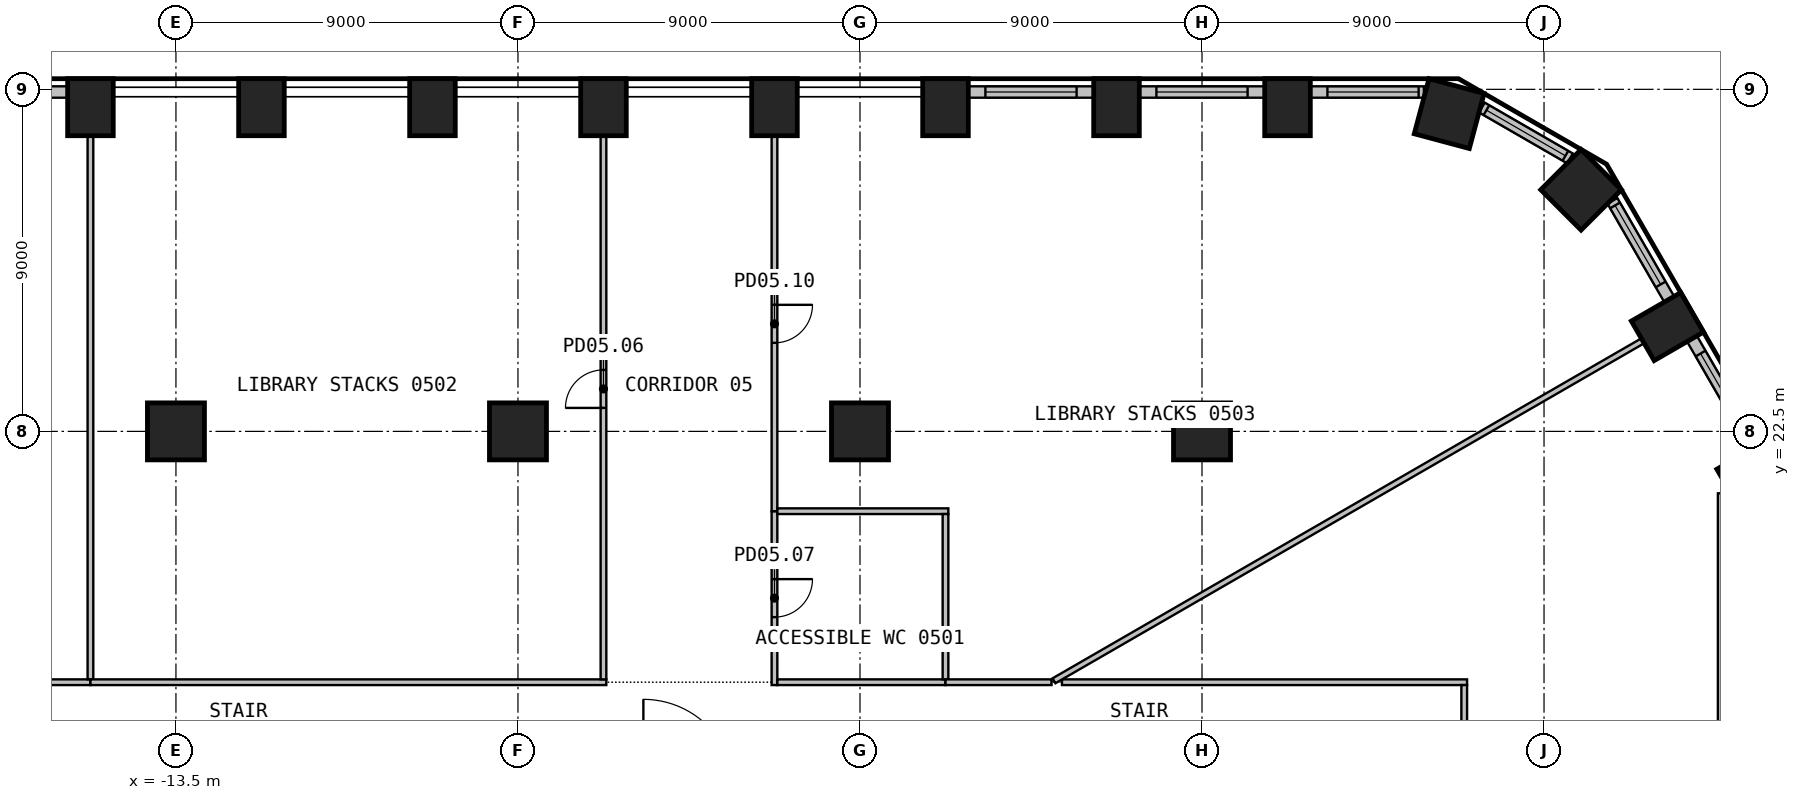
"""IFC4 building model, lengths in metres.
Left out: names, types, materials, properties, quantities, classifications, styles, units other than length and angle.
Written with IfcOpenShell. Run it as: python <this file> out.ifc"""

import sys

from ifc_helpers import new_model, si_unit, direction, frame, frame_2d, origin, origin_2d, place, context, subcontext, project, spatial, rectangle, circle, extrude, element, fill, save


model = new_model("IFC4")
c1 = context("Model", 3, precision=1e-05, world=origin(), true_north=direction((0.0, 1.0)))
c2 = subcontext(c1, "Body", "Model", "MODEL_VIEW")
j1 = project(units=[si_unit("LENGTHUNIT", "METRE"), si_unit("PLANEANGLEUNIT", "RADIAN")], contexts=[c1])
p1 = place(None, origin())
s1 = spatial("IfcSite", under=j1, at=p1, CompositionType="ELEMENT")
p2 = place(p1, origin())
s2 = spatial("IfcBuilding", under=s1, at=p2, CompositionType="ELEMENT")
p3 = place(p2, frame((0.0, 0.0, 25.2)))
s3 = spatial("IfcBuildingStorey", under=s2, at=p3, CompositionType="ELEMENT", Elevation=25.2)
for number, where, z_axis, x_axis in (
    (1, (27.998, 21.361, 0.0), (0.0, 0.0, 1.0), (-0.5, 0.866, 0.0)),
    (2, (25.748, 25.258, 0.0), (0.0, 0.0, 1.0), (-0.5, 0.866, 0.0)),
):
    element("IfcColumn", number, at=place(p3, frame(where, z_axis=z_axis, x_axis=x_axis)), inside=s3, PredefinedType="COLUMN", context=c2, shape_type="SweptSolid", body=[
        extrude(rectangle(XDim=1.2, YDim=1.5, at=origin_2d()), origin(), (0.0, 0.0, 1.0), 4.425),
    ])
for number, where, z_axis, x_axis in (
    (3, (23.475, 28.857, 0.0), (0.0, 0.0, 1.0), (-0.707, 0.707, 0.0)),
    (4, (20.004, 30.861, 0.0), (0.0, 0.0, 1.0), (-0.966, 0.259, 0.0)),
):
    element("IfcColumn", number, at=place(p3, frame(where, z_axis=z_axis, x_axis=x_axis)), inside=s3, PredefinedType="COLUMN", context=c2, shape_type="SweptSolid", body=[
        extrude(rectangle(XDim=1.5, YDim=1.5, at=origin_2d()), origin(), (0.0, 0.0, 1.0), 4.425),
    ])
for number, where, z_axis, x_axis in (
    (5, (15.75, 31.03, 0.0), (0.0, 0.0, 1.0), (-1.0, 0.0, 0.0)),
    (6, (11.25, 31.03, 0.0), (0.0, 0.0, 1.0), (-1.0, 0.0, 0.0)),
    (7, (6.75, 31.03, 0.0), (0.0, 0.0, 1.0), (-1.0, 0.0, 0.0)),
    (8, (2.25, 31.03, 0.0), (0.0, 0.0, 1.0), (-1.0, 0.0, 0.0)),
    (9, (-2.25, 31.03, 0.0), (0.0, 0.0, 1.0), (-1.0, 0.0, 0.0)),
    (10, (-6.75, 31.03, 0.0), (0.0, 0.0, 1.0), (-1.0, 0.0, 0.0)),
    (11, (-11.25, 31.03, 0.0), (0.0, 0.0, 1.0), (-1.0, 0.0, 0.0)),
    (12, (-15.75, 31.03, 0.0), (0.0, 0.0, 1.0), (-1.0, 0.0, 0.0)),
):
    element("IfcColumn", number, at=place(p3, frame(where, z_axis=z_axis, x_axis=x_axis)), inside=s3, PredefinedType="COLUMN", context=c2, shape_type="SweptSolid", body=[
        extrude(rectangle(XDim=1.2, YDim=1.5, at=origin_2d()), origin(), (0.0, 0.0, 1.0), 4.425),
    ])
for number, where, z_axis, x_axis in (
    (13, (-13.5, 22.5, 0.0), (0.0, 0.0, 1.0), (1.0, 0.0, 0.0)),
    (14, (-4.5, 22.5, 0.0), (0.0, 0.0, 1.0), (1.0, 0.0, 0.0)),
    (15, (4.5, 22.5, 0.0), (0.0, 0.0, 1.0), (1.0, 0.0, 0.0)),
    (16, (13.5, 22.5, 0.0), (0.0, 0.0, 1.0), (1.0, 0.0, 0.0)),
):
    element("IfcColumn", number, at=place(p3, frame(where, z_axis=z_axis, x_axis=x_axis)), inside=s3, PredefinedType="COLUMN", context=c2, shape_type="SweptSolid", body=[
        extrude(circle(Radius=0.75, at=origin_2d()), origin(), (0.0, 0.0, 1.0), 4.425),
    ])
p4 = place(p3, frame((28.044, 22.081, 0.0), z_axis=(0.0, 0.0, 1.0), x_axis=(-0.499991515992, 0.866030301974, 0.0)))
e17 = element("IfcWall", 17, at=p4, inside=s3, PredefinedType="SOLIDWALL", context=c2, shape_type="SweptSolid", body=[
    extrude(rectangle(XDim=3.299, YDim=0.3, at=frame_2d((1.649, 0.0))), origin(), (0.0, 0.0, 1.0), 4.425),
])
p5 = place(p4, frame((0.449, 0.0, 0.9)))
e18 = element("IfcOpeningElement", 18, at=p5, cuts=e17, PredefinedType="OPENING", context=c2, shape_type="SweptSolid", body=[
    extrude(rectangle(XDim=2.4, YDim=3.0, at=frame_2d((1.2, 1.5))), frame((0.0, 0.16, 0.0), z_axis=(0.0, -1.0, 0.0), x_axis=(1.0, 0.0, 0.0)), (0.0, 0.0, 1.0), 0.32),
])
p6 = place(p3, frame((25.794, 25.978, 0.0), z_axis=(0.0, 0.0, 1.0), x_axis=(-0.49999586137, 0.866027793211, 0.0)))
e19 = element("IfcWall", 19, at=p6, inside=s3, PredefinedType="SOLIDWALL", context=c2, shape_type="SweptSolid", body=[
    extrude(rectangle(XDim=2.989, YDim=0.3, at=frame_2d((1.494, 0.0))), origin(), (0.0, 0.0, 1.0), 4.425),
])
p7 = place(p6, frame((0.449, 0.0, 0.9)))
e20 = element("IfcOpeningElement", 20, at=p7, cuts=e19, PredefinedType="OPENING", context=c2, shape_type="SweptSolid", body=[
    extrude(rectangle(XDim=2.4, YDim=3.0, at=frame_2d((1.2, 1.5))), frame((0.0, 0.16, 0.0), z_axis=(0.0, -1.0, 0.0), x_axis=(1.0, 0.0, 0.0)), (0.0, 0.0, 1.0), 0.32),
])
p8 = place(p3, frame((23.183, 29.682, 0.0), z_axis=(0.0, 0.0, 1.0), x_axis=(-0.866001915448, 0.500040680786, 0.0)))
e21 = element("IfcWall", 21, at=p8, inside=s3, PredefinedType="SOLIDWALL", context=c2, shape_type="SweptSolid", body=[
    extrude(rectangle(XDim=2.678, YDim=0.3, at=frame_2d((1.339, 0.0))), origin(), (0.0, 0.0, 1.0), 4.425),
])
p9 = place(p8, frame((0.139, 0.0, 0.9)))
e22 = element("IfcOpeningElement", 22, at=p9, cuts=e21, PredefinedType="OPENING", context=c2, shape_type="SweptSolid", body=[
    extrude(rectangle(XDim=2.4, YDim=3.0, at=frame_2d((1.2, 1.5))), frame((0.0, 0.16, 0.0), z_axis=(0.0, -1.0, 0.0), x_axis=(1.0, 0.0, 0.0)), (0.0, 0.0, 1.0), 0.32),
])
p10 = place(p3, frame((19.339, 31.43, 0.0), z_axis=(0.0, 0.0, 1.0), x_axis=(-1.0, 0.0, 0.0)))
e23 = element("IfcWall", 23, at=p10, inside=s3, PredefinedType="SOLIDWALL", context=c2, shape_type="SweptSolid", body=[
    extrude(rectangle(XDim=2.989, YDim=0.3, at=frame_2d((1.494, 0.0))), origin(), (0.0, 0.0, 1.0), 4.425),
])
p11 = place(p10, frame((0.139, 0.0, 0.9)))
e24 = element("IfcOpeningElement", 24, at=p11, cuts=e23, PredefinedType="OPENING", context=c2, shape_type="SweptSolid", body=[
    extrude(rectangle(XDim=2.4, YDim=3.0, at=frame_2d((1.2, 1.5))), frame((0.0, 0.16, 0.0), z_axis=(0.0, -1.0, 0.0), x_axis=(1.0, 0.0, 0.0)), (0.0, 0.0, 1.0), 0.32),
])
p12 = place(p3, frame((15.149, 31.43, 0.0), z_axis=(0.0, 0.0, 1.0), x_axis=(-1.0, 0.0, 0.0)))
e25 = element("IfcWall", 25, at=p12, inside=s3, PredefinedType="SOLIDWALL", context=c2, shape_type="SweptSolid", body=[
    extrude(rectangle(XDim=3.299, YDim=0.3, at=frame_2d((1.649, 0.0))), origin(), (0.0, 0.0, 1.0), 4.425),
])
p13 = place(p12, frame((0.449, 0.0, 0.9)))
e26 = element("IfcOpeningElement", 26, at=p13, cuts=e25, PredefinedType="OPENING", context=c2, shape_type="SweptSolid", body=[
    extrude(rectangle(XDim=2.4, YDim=3.0, at=frame_2d((1.2, 1.5))), frame((0.0, 0.16, 0.0), z_axis=(0.0, -1.0, 0.0), x_axis=(1.0, 0.0, 0.0)), (0.0, 0.0, 1.0), 0.32),
])
p14 = place(p3, frame((10.649, 31.43, 0.0), z_axis=(0.0, 0.0, 1.0), x_axis=(-1.0, 0.0, 0.0)))
e27 = element("IfcWall", 27, at=p14, inside=s3, PredefinedType="SOLIDWALL", context=c2, shape_type="SweptSolid", body=[
    extrude(rectangle(XDim=3.299, YDim=0.3, at=frame_2d((1.649, 0.0))), origin(), (0.0, 0.0, 1.0), 4.425),
])
p15 = place(p14, frame((0.449, 0.0, 0.9)))
e28 = element("IfcOpeningElement", 28, at=p15, cuts=e27, PredefinedType="OPENING", context=c2, shape_type="SweptSolid", body=[
    extrude(rectangle(XDim=2.4, YDim=3.0, at=frame_2d((1.2, 1.5))), frame((0.0, 0.16, 0.0), z_axis=(0.0, -1.0, 0.0), x_axis=(1.0, 0.0, 0.0)), (0.0, 0.0, 1.0), 0.32),
])
p16 = place(p3, frame((-16.351, 31.43, 0.0), z_axis=(0.0, 0.0, 1.0), x_axis=(-1.0, 0.0, 0.0)))
e29 = element("IfcWall", 29, at=p16, inside=s3, PredefinedType="SOLIDWALL", context=c2, shape_type="SweptSolid", body=[
    extrude(rectangle(XDim=2.989, YDim=0.3, at=frame_2d((1.494, 0.0))), origin(), (0.0, 0.0, 1.0), 4.425),
])
p17 = place(p16, frame((0.449, 0.0, 0.9)))
e30 = element("IfcOpeningElement", 30, at=p17, cuts=e29, PredefinedType="OPENING", context=c2, shape_type="SweptSolid", body=[
    extrude(rectangle(XDim=2.4, YDim=3.0, at=frame_2d((1.2, 1.5))), frame((0.0, 0.16, 0.0), z_axis=(0.0, -1.0, 0.0), x_axis=(1.0, 0.0, 0.0)), (0.0, 0.0, 1.0), 0.32),
])
p18 = place(p3, frame((-15.75, 15.9, 0.0), z_axis=(0.0, 0.0, 1.0), x_axis=(-1.0, 0.0, 0.0)))
e31 = element("IfcWall", 31, at=p18, inside=s3, PredefinedType="PARTITIONING", context=c2, shape_type="SweptSolid", body=[
    extrude(rectangle(XDim=4.575, YDim=0.15, at=frame_2d((2.288, 0.0))), origin(), (0.0, 0.0, 1.0), 4.425),
])
p19 = place(p3, frame((-15.75, 30.26, 0.0), z_axis=(0.0, 0.0, 1.0), x_axis=(0.0, -1.0, 0.0)))
e32 = element("IfcWall", 32, at=p19, inside=s3, PredefinedType="PARTITIONING", context=c2, shape_type="SweptSolid", body=[
    extrude(rectangle(XDim=14.285, YDim=0.15, at=frame_2d((7.142, 0.0))), origin(), (0.0, 0.0, 1.0), 4.425),
])
p20 = place(p3, frame((-2.175, 15.9, 0.0), z_axis=(0.0, 0.0, 1.0), x_axis=(-1.0, 0.0, 0.0)))
e33 = element("IfcWall", 33, at=p20, inside=s3, PredefinedType="PARTITIONING", context=c2, shape_type="SweptSolid", body=[
    extrude(rectangle(XDim=13.575, YDim=0.15, at=frame_2d((6.788, 0.0))), origin(), (0.0, 0.0, 1.0), 4.425),
])
p21 = place(p3, frame((-2.25, 15.975, 0.0), z_axis=(0.0, 0.0, 1.0), x_axis=(0.0, 1.0, 0.0)))
e34 = element("IfcWall", 34, at=p21, inside=s3, PredefinedType="PARTITIONING", context=c2, shape_type="SweptSolid", body=[
    extrude(rectangle(XDim=14.285, YDim=0.15, at=frame_2d((7.142, 0.0))), origin(), (0.0, 0.0, 1.0), 4.425),
])
p22 = place(p21, frame((7.142, 0.0, 0.0)))
e35 = element("IfcOpeningElement", 35, at=p22, cuts=e34, PredefinedType="OPENING", context=c2, shape_type="SweptSolid", body=[
    extrude(rectangle(XDim=1.0, YDim=2.1, at=frame_2d((0.5, 1.05))), frame((0.0, 0.085, 0.0), z_axis=(0.0, -1.0, 0.0), x_axis=(1.0, 0.0, 0.0)), (0.0, 0.0, 1.0), 0.17),
])
p23 = place(p3, frame((2.25, 20.4, 0.0), z_axis=(0.0, 0.0, 1.0), x_axis=(0.0, -1.0, 0.0)))
e36 = element("IfcWall", 36, at=p23, inside=s3, PredefinedType="PARTITIONING", context=c2, shape_type="SweptSolid", body=[
    extrude(rectangle(XDim=4.575, YDim=0.15, at=frame_2d((2.288, 0.0))), origin(), (0.0, 0.0, 1.0), 4.425),
])
p24 = place(p23, frame((1.788, 0.0, 0.0)))
e37 = element("IfcOpeningElement", 37, at=p24, cuts=e36, PredefinedType="OPENING", context=c2, shape_type="SweptSolid", body=[
    extrude(rectangle(XDim=1.0, YDim=2.1, at=frame_2d((0.5, 1.05))), frame((0.0, 0.085, 0.0), z_axis=(0.0, -1.0, 0.0), x_axis=(1.0, 0.0, 0.0)), (0.0, 0.0, 1.0), 0.17),
])
p25 = place(p3, frame((6.75, 15.9, 0.0), z_axis=(0.0, 0.0, 1.0), x_axis=(-1.0, 0.0, 0.0)))
e38 = element("IfcWall", 38, at=p25, inside=s3, PredefinedType="PARTITIONING", context=c2, shape_type="SweptSolid", body=[
    extrude(rectangle(XDim=4.425, YDim=0.15, at=frame_2d((2.212, 0.0))), origin(), (0.0, 0.0, 1.0), 4.425),
])
p26 = place(p3, frame((2.25, 30.26, 0.0), z_axis=(0.0, 0.0, 1.0), x_axis=(0.0, -1.0, 0.0)))
e39 = element("IfcWall", 39, at=p26, inside=s3, PredefinedType="PARTITIONING", context=c2, shape_type="SweptSolid", body=[
    extrude(rectangle(XDim=9.86, YDim=0.15, at=frame_2d((4.93, 0.0))), origin(), (0.0, 0.0, 1.0), 4.425),
])
p27 = place(p26, frame((4.43, 0.0, 0.0)))
e40 = element("IfcOpeningElement", 40, at=p27, cuts=e39, PredefinedType="OPENING", context=c2, shape_type="SweptSolid", body=[
    extrude(rectangle(XDim=1.0, YDim=2.1, at=frame_2d((0.5, 1.05))), frame((0.0, 0.085, 0.0), z_axis=(0.0, -1.0, 0.0), x_axis=(1.0, 0.0, 0.0)), (0.0, 0.0, 1.0), 0.17),
])
p28 = place(p3, frame((2.325, 20.4, 0.0), z_axis=(0.0, 0.0, 1.0), x_axis=(1.0, 0.0, 0.0)))
e41 = element("IfcWall", 41, at=p28, inside=s3, PredefinedType="PARTITIONING", context=c2, shape_type="SweptSolid", body=[
    extrude(rectangle(XDim=4.5, YDim=0.15, at=frame_2d((2.25, 0.0))), origin(), (0.0, 0.0, 1.0), 4.425),
])
p29 = place(p3, frame((6.75, 20.325, 0.0), z_axis=(0.0, 0.0, 1.0), x_axis=(0.0, -1.0, 0.0)))
e42 = element("IfcWall", 42, at=p29, inside=s3, PredefinedType="PARTITIONING", context=c2, shape_type="SweptSolid", body=[
    extrude(rectangle(XDim=4.35, YDim=0.15, at=frame_2d((2.175, 0.0))), origin(), (0.0, 0.0, 1.0), 4.425),
])
p30 = place(p3, frame((9.54, 15.9, 0.0), z_axis=(0.0, 0.0, 1.0), x_axis=(-1.0, 0.0, 0.0)))
e43 = element("IfcWall", 43, at=p30, inside=s3, PredefinedType="PARTITIONING", context=c2, shape_type="SweptSolid", body=[
    extrude(rectangle(XDim=2.79, YDim=0.15, at=frame_2d((1.395, 0.0))), origin(), (0.0, 0.0, 1.0), 4.425),
])
p31 = place(p3, frame((20.475, 15.9, 0.0), z_axis=(0.0, 0.0, 1.0), x_axis=(-1.0, 0.0, 0.0)))
e44 = element("IfcWall", 44, at=p31, inside=s3, PredefinedType="PARTITIONING", context=c2, shape_type="SweptSolid", body=[
    extrude(rectangle(XDim=10.66, YDim=0.15, at=frame_2d((5.33, 0.0))), origin(), (0.0, 0.0, 1.0), 4.425),
])
p32 = place(p3, frame((25.081, 24.873, 0.0), z_axis=(0.0, 0.0, 1.0), x_axis=(-0.866008122325, -0.500029931171, 0.0)))
e45 = element("IfcWall", 45, at=p32, inside=s3, PredefinedType="PARTITIONING", context=c2, shape_type="SweptSolid", body=[
    extrude(rectangle(XDim=17.87, YDim=0.15, at=frame_2d((8.935, 0.0))), origin(), (0.0, 0.0, 1.0), 4.425),
])
p33 = place(p3, frame((20.4, 2.175, 0.0), z_axis=(0.0, 0.0, 1.0), x_axis=(0.0, 1.0, 0.0)))
e46 = element("IfcWall", 46, at=p33, inside=s3, PredefinedType="PARTITIONING", context=c2, shape_type="SweptSolid", body=[
    extrude(rectangle(XDim=13.65, YDim=0.15, at=frame_2d((6.825, 0.0))), origin(), (0.0, 0.0, 1.0), 4.425),
])
p34 = place(p33, frame((6.325, 0.0, 0.0)))
e47 = element("IfcOpeningElement", 47, at=p34, cuts=e46, PredefinedType="OPENING", context=c2, shape_type="SweptSolid", body=[
    extrude(rectangle(XDim=1.0, YDim=2.1, at=frame_2d((0.5, 1.05))), frame((0.0, 0.085, 0.0), z_axis=(0.0, -1.0, 0.0), x_axis=(1.0, 0.0, 0.0)), (0.0, 0.0, 1.0), 0.17),
])
p35 = place(p3, frame((27.15, 20.871, 0.0), z_axis=(0.0, 0.0, 1.0), x_axis=(0.0, -1.0, 0.0)))
e48 = element("IfcWall", 48, at=p35, inside=s3, PredefinedType="PARTITIONING", context=c2, shape_type="SweptSolid", body=[
    extrude(rectangle(XDim=18.546, YDim=0.15, at=frame_2d((9.273, 0.0))), origin(), (0.0, 0.0, 1.0), 4.425),
])
p36 = place(p5, origin())
e49 = element("IfcWindow", 49, at=p36, inside=s3, PartitioningType="SINGLE_PANEL", PredefinedType="WINDOW", context=c2, shape_type="SweptSolid", body=[
    extrude(rectangle(XDim=2.4, YDim=3.0, at=frame_2d((1.2, 1.5))), frame((0.0, 0.03, 0.0), z_axis=(0.0, -1.0, 0.0), x_axis=(1.0, 0.0, 0.0)), (0.0, 0.0, 1.0), 0.06),
])
fill(e18, e49)
p37 = place(p7, origin())
e50 = element("IfcWindow", 50, at=p37, inside=s3, PartitioningType="SINGLE_PANEL", PredefinedType="WINDOW", context=c2, shape_type="SweptSolid", body=[
    extrude(rectangle(XDim=2.4, YDim=3.0, at=frame_2d((1.2, 1.5))), frame((0.0, 0.03, 0.0), z_axis=(0.0, -1.0, 0.0), x_axis=(1.0, 0.0, 0.0)), (0.0, 0.0, 1.0), 0.06),
])
fill(e20, e50)
p38 = place(p9, origin())
e51 = element("IfcWindow", 51, at=p38, inside=s3, PartitioningType="SINGLE_PANEL", PredefinedType="WINDOW", context=c2, shape_type="SweptSolid", body=[
    extrude(rectangle(XDim=2.4, YDim=3.0, at=frame_2d((1.2, 1.5))), frame((0.0, 0.03, 0.0), z_axis=(0.0, -1.0, 0.0), x_axis=(1.0, 0.0, 0.0)), (0.0, 0.0, 1.0), 0.06),
])
fill(e22, e51)
p39 = place(p11, origin())
e52 = element("IfcWindow", 52, at=p39, inside=s3, PartitioningType="SINGLE_PANEL", PredefinedType="WINDOW", context=c2, shape_type="SweptSolid", body=[
    extrude(rectangle(XDim=2.4, YDim=3.0, at=frame_2d((1.2, 1.5))), frame((0.0, 0.03, 0.0), z_axis=(0.0, -1.0, 0.0), x_axis=(1.0, 0.0, 0.0)), (0.0, 0.0, 1.0), 0.06),
])
fill(e24, e52)
p40 = place(p13, origin())
e53 = element("IfcWindow", 53, at=p40, inside=s3, PartitioningType="SINGLE_PANEL", PredefinedType="WINDOW", context=c2, shape_type="SweptSolid", body=[
    extrude(rectangle(XDim=2.4, YDim=3.0, at=frame_2d((1.2, 1.5))), frame((0.0, 0.03, 0.0), z_axis=(0.0, -1.0, 0.0), x_axis=(1.0, 0.0, 0.0)), (0.0, 0.0, 1.0), 0.06),
])
fill(e26, e53)
p41 = place(p15, origin())
e54 = element("IfcWindow", 54, at=p41, inside=s3, PartitioningType="SINGLE_PANEL", PredefinedType="WINDOW", context=c2, shape_type="SweptSolid", body=[
    extrude(rectangle(XDim=2.4, YDim=3.0, at=frame_2d((1.2, 1.5))), frame((0.0, 0.03, 0.0), z_axis=(0.0, -1.0, 0.0), x_axis=(1.0, 0.0, 0.0)), (0.0, 0.0, 1.0), 0.06),
])
fill(e28, e54)
p42 = place(p22, origin())
e55 = element("IfcDoor", 55, at=p42, inside=s3, OperationType="SINGLE_SWING_LEFT", PredefinedType="DOOR", context=c2, shape_type="SweptSolid", body=[
    extrude(rectangle(XDim=1.0, YDim=2.1, at=frame_2d((0.5, 1.05))), frame((0.0, 0.025, 0.0), z_axis=(0.0, -1.0, 0.0), x_axis=(1.0, 0.0, 0.0)), (0.0, 0.0, 1.0), 0.05),
])
fill(e35, e55)
p43 = place(p24, origin())
e56 = element("IfcDoor", 56, at=p43, inside=s3, OperationType="SINGLE_SWING_RIGHT", PredefinedType="DOOR", context=c2, shape_type="SweptSolid", body=[
    extrude(rectangle(XDim=1.0, YDim=2.1, at=frame_2d((0.5, 1.05))), frame((0.0, 0.025, 0.0), z_axis=(0.0, -1.0, 0.0), x_axis=(1.0, 0.0, 0.0)), (0.0, 0.0, 1.0), 0.05),
])
fill(e37, e56)
p44 = place(p27, origin())
e57 = element("IfcDoor", 57, at=p44, inside=s3, OperationType="SINGLE_SWING_RIGHT", PredefinedType="DOOR", context=c2, shape_type="SweptSolid", body=[
    extrude(rectangle(XDim=1.0, YDim=2.1, at=frame_2d((0.5, 1.05))), frame((0.0, 0.025, 0.0), z_axis=(0.0, -1.0, 0.0), x_axis=(1.0, 0.0, 0.0)), (0.0, 0.0, 1.0), 0.05),
])
fill(e40, e57)
save(model, sys.argv[1])
